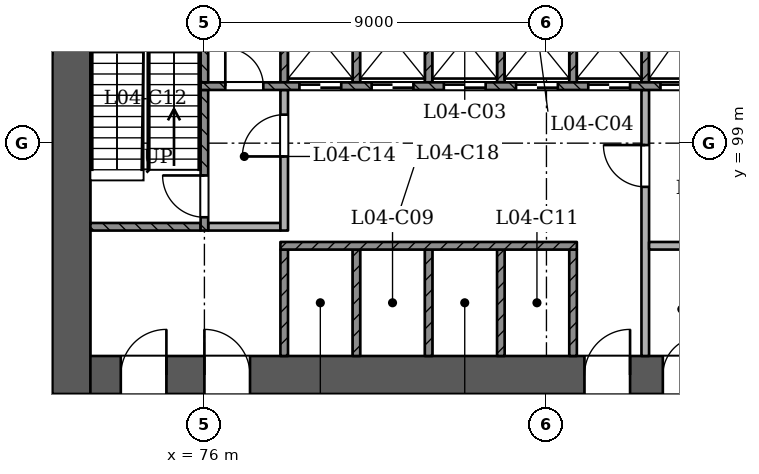
"""IFC4 building model, lengths in metres.
Left out: names, types, materials, properties, quantities, classifications, styles, units other than length and angle.
Written with IfcOpenShell. Run it as: python <this file> out.ifc"""

import sys

from ifc_helpers import new_model, si_unit, direction, frame, frame_2d, origin, place, context, subcontext, project, spatial, rectangle, extrude, element, fill, save


model = new_model("IFC4")
c1 = context("Model", 3, precision=1e-05, world=origin(), true_north=direction((0.0, 1.0)))
c2 = subcontext(c1, "Body", "Model", "MODEL_VIEW")
j1 = project(units=[si_unit("LENGTHUNIT", "METRE"), si_unit("PLANEANGLEUNIT", "RADIAN")], contexts=[c1])
p1 = place(None, origin())
s1 = spatial("IfcSite", under=j1, at=p1, CompositionType="ELEMENT")
p2 = place(p1, origin())
s2 = spatial("IfcBuilding", under=s1, at=p2, CompositionType="ELEMENT")
p3 = place(p2, frame((0.0, 0.0, 22.5)))
s3 = spatial("IfcBuildingStorey", under=s2, at=p3, CompositionType="ELEMENT", Elevation=22.5)
p4 = place(p3, frame((72.5, 92.9, 0.0), z_axis=(0.0, 0.0, 1.0), x_axis=(1.0, 0.0, 0.0)))
e1 = element("IfcWall", 1, at=p4, inside=s3, PredefinedType="SHEAR", context=c2, shape_type="SweptSolid", body=[
    extrude(rectangle(XDim=25.5, YDim=1.0, at=frame_2d((12.75, 0.0))), origin(), (0.0, 0.0, 1.0), 4.5),
])
p5 = place(p4, frame((1.3, 0.0, 0.0)))
e2 = element("IfcOpeningElement", 2, at=p5, cuts=e1, PredefinedType="OPENING", context=c2, shape_type="SweptSolid", body=[
    extrude(rectangle(XDim=1.2, YDim=2.1, at=frame_2d((0.6, 1.05))), frame((0.0, 0.51, 0.0), z_axis=(0.0, -1.0, 0.0), x_axis=(1.0, 0.0, 0.0)), (0.0, 0.0, 1.0), 1.021),
])
p6 = place(p4, frame((3.5, 0.0, 0.0)))
e3 = element("IfcOpeningElement", 3, at=p6, cuts=e1, PredefinedType="OPENING", context=c2, shape_type="SweptSolid", body=[
    extrude(rectangle(XDim=1.2, YDim=2.1, at=frame_2d((0.6, 1.05))), frame((0.0, 0.51, 0.0), z_axis=(0.0, -1.0, 0.0), x_axis=(1.0, 0.0, 0.0)), (0.0, 0.0, 1.0), 1.021),
])
p7 = place(p4, frame((13.5, 0.0, 0.0)))
e4 = element("IfcOpeningElement", 4, at=p7, cuts=e1, PredefinedType="OPENING", context=c2, shape_type="SweptSolid", body=[
    extrude(rectangle(XDim=1.2, YDim=2.1, at=frame_2d((0.6, 1.05))), frame((0.0, 0.51, 0.0), z_axis=(0.0, -1.0, 0.0), x_axis=(1.0, 0.0, 0.0)), (0.0, 0.0, 1.0), 1.021),
])
p8 = place(p4, frame((15.562, 0.0, 0.0)))
e5 = element("IfcOpeningElement", 5, at=p8, cuts=e1, PredefinedType="OPENING", context=c2, shape_type="SweptSolid", body=[
    extrude(rectangle(XDim=1.0, YDim=2.1, at=frame_2d((0.5, 1.05))), frame((0.0, 0.51, 0.0), z_axis=(0.0, -1.0, 0.0), x_axis=(1.0, 0.0, 0.0)), (0.0, 0.0, 1.0), 1.021),
])
p9 = place(p4, frame((17.8, 0.0, 0.0)))
e6 = element("IfcOpeningElement", 6, at=p9, cuts=e1, PredefinedType="OPENING", context=c2, shape_type="SweptSolid", body=[
    extrude(rectangle(XDim=1.0, YDim=2.1, at=frame_2d((0.5, 1.05))), frame((0.0, 0.51, 0.0), z_axis=(0.0, -1.0, 0.0), x_axis=(1.0, 0.0, 0.0)), (0.0, 0.0, 1.0), 1.021),
])
p10 = place(p4, frame((20.35, 0.0, 0.0)))
e7 = element("IfcOpeningElement", 7, at=p10, cuts=e1, PredefinedType="OPENING", context=c2, shape_type="SweptSolid", body=[
    extrude(rectangle(XDim=1.0, YDim=2.1, at=frame_2d((0.5, 1.05))), frame((0.0, 0.51, 0.0), z_axis=(0.0, -1.0, 0.0), x_axis=(1.0, 0.0, 0.0)), (0.0, 0.0, 1.0), 1.021),
])
p11 = place(p4, frame((22.837, 0.0, 0.0)))
e8 = element("IfcOpeningElement", 8, at=p11, cuts=e1, PredefinedType="OPENING", context=c2, shape_type="SweptSolid", body=[
    extrude(rectangle(XDim=1.0, YDim=2.1, at=frame_2d((0.5, 1.05))), frame((0.0, 0.51, 0.0), z_axis=(0.0, -1.0, 0.0), x_axis=(1.0, 0.0, 0.0)), (0.0, 0.0, 1.0), 1.021),
])
p12 = place(p3, frame((72.5, 103.9, 0.0), z_axis=(0.0, 0.0, 1.0), x_axis=(0.0, -1.0, 0.0)))
e9 = element("IfcWall", 9, at=p12, inside=s3, PredefinedType="SHEAR", context=c2, shape_type="SweptSolid", body=[
    extrude(rectangle(XDim=11.5, YDim=1.0, at=frame_2d((5.75, 0.0))), origin(), (0.0, 0.0, 1.0), 4.5),
])
p13 = place(p3, frame((61.093, 96.062, 0.0), z_axis=(0.0, 0.0, 1.0), x_axis=(0.5000018851, -0.866024315419, 0.0)))
e10 = element("IfcWall", 10, at=p13, inside=s3, PredefinedType="PARTITIONING", context=c2, shape_type="SweptSolid", body=[
    extrude(rectangle(XDim=45.0, YDim=0.15, at=frame_2d((22.5, 0.0))), origin(), (0.0, 0.0, 1.0), 3.6),
])
p14 = place(p13, frame((6.15, 0.0, 0.0)))
e11 = element("IfcOpeningElement", 11, at=p14, cuts=e10, PredefinedType="OPENING", context=c2, shape_type="SweptSolid", body=[
    extrude(rectangle(XDim=1.2, YDim=2.1, at=frame_2d((0.6, 1.05))), frame((0.0, 0.085, 0.0), z_axis=(0.0, -1.0, 0.0), x_axis=(1.0, 0.0, 0.0)), (0.0, 0.0, 1.0), 0.171),
])
p15 = place(p13, frame((16.3, 0.0, 0.0)))
e12 = element("IfcOpeningElement", 12, at=p15, cuts=e10, PredefinedType="OPENING", context=c2, shape_type="SweptSolid", body=[
    extrude(rectangle(XDim=1.2, YDim=2.1, at=frame_2d((0.6, 1.05))), frame((0.0, 0.085, 0.0), z_axis=(0.0, -1.0, 0.0), x_axis=(1.0, 0.0, 0.0)), (0.0, 0.0, 1.0), 0.171),
])
p16 = place(p13, frame((24.25, 0.0, 0.0)))
e13 = element("IfcOpeningElement", 13, at=p16, cuts=e10, PredefinedType="OPENING", context=c2, shape_type="SweptSolid", body=[
    extrude(rectangle(XDim=1.0, YDim=2.1, at=frame_2d((0.5, 1.05))), frame((0.0, 0.085, 0.0), z_axis=(0.0, -1.0, 0.0), x_axis=(1.0, 0.0, 0.0)), (0.0, 0.0, 1.0), 0.171),
])
p17 = place(p13, frame((27.721, 0.0, 0.0)))
e14 = element("IfcOpeningElement", 14, at=p17, cuts=e10, PredefinedType="OPENING", context=c2, shape_type="SweptSolid", body=[
    extrude(rectangle(XDim=0.9, YDim=2.1, at=frame_2d((0.45, 1.05))), frame((0.0, 0.085, 0.0), z_axis=(0.0, -1.0, 0.0), x_axis=(1.0, 0.0, 0.0)), (0.0, 0.0, 1.0), 0.171),
])
p18 = place(p13, frame((29.971, 0.0, 0.0)))
e15 = element("IfcOpeningElement", 15, at=p18, cuts=e10, PredefinedType="OPENING", context=c2, shape_type="SweptSolid", body=[
    extrude(rectangle(XDim=0.9, YDim=2.1, at=frame_2d((0.45, 1.05))), frame((0.0, 0.085, 0.0), z_axis=(0.0, -1.0, 0.0), x_axis=(1.0, 0.0, 0.0)), (0.0, 0.0, 1.0), 0.171),
])
p19 = place(p13, frame((37.65, 0.0, 0.0)))
e16 = element("IfcOpeningElement", 16, at=p19, cuts=e10, PredefinedType="OPENING", context=c2, shape_type="SweptSolid", body=[
    extrude(rectangle(XDim=1.2, YDim=2.1, at=frame_2d((0.6, 1.05))), frame((0.0, 0.085, 0.0), z_axis=(0.0, -1.0, 0.0), x_axis=(1.0, 0.0, 0.0)), (0.0, 0.0, 1.0), 0.171),
])
p20 = place(p3, frame((86.407, 57.091, 0.0), z_axis=(0.0, 0.0, 1.0), x_axis=(0.49999953585, 0.866025671762, 0.0)))
e17 = element("IfcWall", 17, at=p20, inside=s3, PredefinedType="PARTITIONING", context=c2, shape_type="SweptSolid", body=[
    extrude(rectangle(XDim=45.0, YDim=0.15, at=frame_2d((22.5, 0.0))), origin(), (0.0, 0.0, 1.0), 3.6),
])
p21 = place(p20, frame((6.15, 0.0, 0.0)))
e18 = element("IfcOpeningElement", 18, at=p21, cuts=e17, PredefinedType="OPENING", context=c2, shape_type="SweptSolid", body=[
    extrude(rectangle(XDim=1.2, YDim=2.1, at=frame_2d((0.6, 1.05))), frame((0.0, 0.085, 0.0), z_axis=(0.0, -1.0, 0.0), x_axis=(1.0, 0.0, 0.0)), (0.0, 0.0, 1.0), 0.171),
])
p22 = place(p20, frame((16.3, 0.0, 0.0)))
e19 = element("IfcOpeningElement", 19, at=p22, cuts=e17, PredefinedType="OPENING", context=c2, shape_type="SweptSolid", body=[
    extrude(rectangle(XDim=1.2, YDim=2.1, at=frame_2d((0.6, 1.05))), frame((0.0, 0.085, 0.0), z_axis=(0.0, -1.0, 0.0), x_axis=(1.0, 0.0, 0.0)), (0.0, 0.0, 1.0), 0.171),
])
p23 = place(p20, frame((24.25, 0.0, 0.0)))
e20 = element("IfcOpeningElement", 20, at=p23, cuts=e17, PredefinedType="OPENING", context=c2, shape_type="SweptSolid", body=[
    extrude(rectangle(XDim=1.0, YDim=2.1, at=frame_2d((0.5, 1.05))), frame((0.0, 0.085, 0.0), z_axis=(0.0, -1.0, 0.0), x_axis=(1.0, 0.0, 0.0)), (0.0, 0.0, 1.0), 0.171),
])
p24 = place(p20, frame((30.9, 0.0, 0.0)))
e21 = element("IfcOpeningElement", 21, at=p24, cuts=e17, PredefinedType="OPENING", context=c2, shape_type="SweptSolid", body=[
    extrude(rectangle(XDim=1.2, YDim=2.1, at=frame_2d((0.6, 1.05))), frame((0.0, 0.085, 0.0), z_axis=(0.0, -1.0, 0.0), x_axis=(1.0, 0.0, 0.0)), (0.0, 0.0, 1.0), 0.171),
])
p25 = place(p20, frame((36.761, 0.0, 0.0)))
e22 = element("IfcOpeningElement", 22, at=p25, cuts=e17, PredefinedType="OPENING", context=c2, shape_type="SweptSolid", body=[
    extrude(rectangle(XDim=1.0, YDim=2.1, at=frame_2d((0.5, 1.05))), frame((0.0, 0.085, 0.0), z_axis=(0.0, -1.0, 0.0), x_axis=(1.0, 0.0, 0.0)), (0.0, 0.0, 1.0), 0.171),
])
p26 = place(p20, frame((39.011, 0.0, 0.0)))
e23 = element("IfcOpeningElement", 23, at=p26, cuts=e17, PredefinedType="OPENING", context=c2, shape_type="SweptSolid", body=[
    extrude(rectangle(XDim=1.0, YDim=2.1, at=frame_2d((0.5, 1.05))), frame((0.0, 0.085, 0.0), z_axis=(0.0, -1.0, 0.0), x_axis=(1.0, 0.0, 0.0)), (0.0, 0.0, 1.0), 0.171),
])
p27 = place(p20, frame((42.25, 0.0, 0.0)))
e24 = element("IfcOpeningElement", 24, at=p27, cuts=e17, PredefinedType="OPENING", context=c2, shape_type="SweptSolid", body=[
    extrude(rectangle(XDim=1.0, YDim=2.1, at=frame_2d((0.5, 1.05))), frame((0.0, 0.085, 0.0), z_axis=(0.0, -1.0, 0.0), x_axis=(1.0, 0.0, 0.0)), (0.0, 0.0, 1.0), 0.171),
])
p28 = place(p3, frame((72.0, 101.401, 0.0), z_axis=(0.0, 0.0, 1.0), x_axis=(-0.999999909973, -0.000424328109, 0.0)))
e25 = element("IfcWall", 25, at=p28, inside=s3, PredefinedType="PARTITIONING", context=c2, shape_type="SweptSolid", body=[
    extrude(rectangle(XDim=1.726, YDim=0.15, at=frame_2d((0.863, 0.0))), origin(), (0.0, 0.0, 1.0), 4.0),
])
for number, where, z_axis, x_axis in (
    (26, (78.1, 93.4, 0.0), (0.0, 0.0, 1.0), (0.0, 1.0, 0.0)),
    (27, (80.0, 93.4, 0.0), (0.0, 0.0, 1.0), (0.0, 1.0, 0.0)),
    (28, (81.9, 93.4, 0.0), (0.0, 0.0, 1.0), (0.0, 1.0, 0.0)),
    (29, (83.8, 93.4, 0.0), (0.0, 0.0, 1.0), (0.0, 1.0, 0.0)),
    (30, (85.7, 93.4, 0.0), (0.0, 0.0, 1.0), (0.0, 1.0, 0.0)),
):
    element("IfcWall", number, at=place(p3, frame(where, z_axis=z_axis, x_axis=x_axis)), inside=s3, PredefinedType="SOLIDWALL", context=c2, shape_type="SweptSolid", body=[
        extrude(rectangle(XDim=2.8, YDim=0.2, at=frame_2d((1.4, 0.0))), origin(), (0.0, 0.0, 1.0), 4.0),
    ])
p29 = place(p3, frame((87.6, 93.4, 0.0), z_axis=(0.0, 0.0, 1.0), x_axis=(0.0, 1.0, 0.0)))
e31 = element("IfcWall", 31, at=p29, inside=s3, PredefinedType="PARTITIONING", context=c2, shape_type="SweptSolid", body=[
    extrude(rectangle(XDim=7.0, YDim=0.2, at=frame_2d((3.5, 0.0))), origin(), (0.0, 0.0, 1.0), 4.0),
])
p30 = place(p29, frame((4.45, 0.0, 0.0)))
e32 = element("IfcOpeningElement", 32, at=p30, cuts=e31, PredefinedType="OPENING", context=c2, shape_type="SweptSolid", body=[
    extrude(rectangle(XDim=1.1, YDim=2.1, at=frame_2d((0.55, 1.05))), frame((0.0, 0.11, 0.0), z_axis=(0.0, -1.0, 0.0), x_axis=(1.0, 0.0, 0.0)), (0.0, 0.0, 1.0), 0.221),
])
p31 = place(p3, frame((78.0, 96.3, 0.0), z_axis=(0.0, 0.0, 1.0), x_axis=(1.0, 0.0, 0.0)))
e33 = element("IfcWall", 33, at=p31, inside=s3, PredefinedType="SOLIDWALL", context=c2, shape_type="SweptSolid", body=[
    extrude(rectangle(XDim=7.8, YDim=0.2, at=frame_2d((3.9, 0.0))), origin(), (0.0, 0.0, 1.0), 4.0),
])
p32 = place(p3, frame((87.7, 96.3, 0.0), z_axis=(0.0, 0.0, 1.0), x_axis=(1.0, 0.0, 0.0)))
e34 = element("IfcWall", 34, at=p32, inside=s3, PredefinedType="PARTITIONING", context=c2, shape_type="SweptSolid", body=[
    extrude(rectangle(XDim=3.6, YDim=0.2, at=frame_2d((1.8, 0.0))), origin(), (0.0, 0.0, 1.0), 4.0),
])
p33 = place(p3, frame((73.0, 96.8, 0.0), z_axis=(0.0, 0.0, 1.0), x_axis=(1.0, 0.0, 0.0)))
e35 = element("IfcWall", 35, at=p33, inside=s3, PredefinedType="SOLIDWALL", context=c2, shape_type="SweptSolid", body=[
    extrude(rectangle(XDim=2.9, YDim=0.2, at=frame_2d((1.45, 0.0))), origin(), (0.0, 0.0, 1.0), 4.0),
])
p34 = place(p3, frame((76.0, 96.7, 0.0), z_axis=(0.0, 0.0, 1.0), x_axis=(0.0, 1.0, 0.0)))
e36 = element("IfcWall", 36, at=p34, inside=s3, PredefinedType="SOLIDWALL", context=c2, shape_type="SweptSolid", body=[
    extrude(rectangle(XDim=3.7, YDim=0.2, at=frame_2d((1.85, 0.0))), origin(), (0.0, 0.0, 1.0), 4.0),
])
p35 = place(p34, frame((0.35, 0.0, 0.0)))
e37 = element("IfcOpeningElement", 37, at=p35, cuts=e36, PredefinedType="OPENING", context=c2, shape_type="SweptSolid", body=[
    extrude(rectangle(XDim=1.1, YDim=2.1, at=frame_2d((0.55, 1.05))), frame((0.0, 0.11, 0.0), z_axis=(0.0, -1.0, 0.0), x_axis=(1.0, 0.0, 0.0)), (0.0, 0.0, 1.0), 0.221),
])
p36 = place(p3, frame((76.1, 96.8, 0.0), z_axis=(0.0, 0.0, 1.0), x_axis=(1.0, 0.0, 0.0)))
e38 = element("IfcWall", 38, at=p36, inside=s3, PredefinedType="PARTITIONING", context=c2, shape_type="SweptSolid", body=[
    extrude(rectangle(XDim=1.9, YDim=0.2, at=frame_2d((0.95, 0.0))), origin(), (0.0, 0.0, 1.0), 4.0),
])
p37 = place(p3, frame((78.1, 96.7, 0.0), z_axis=(0.0, 0.0, 1.0), x_axis=(0.0, 1.0, 0.0)))
e39 = element("IfcWall", 39, at=p37, inside=s3, PredefinedType="PARTITIONING", context=c2, shape_type="SweptSolid", body=[
    extrude(rectangle(XDim=3.7, YDim=0.2, at=frame_2d((1.85, 0.0))), origin(), (0.0, 0.0, 1.0), 4.0),
])
p38 = place(p37, frame((1.95, 0.0, 0.0)))
e40 = element("IfcOpeningElement", 40, at=p38, cuts=e39, PredefinedType="OPENING", context=c2, shape_type="SweptSolid", body=[
    extrude(rectangle(XDim=1.1, YDim=2.1, at=frame_2d((0.55, 1.05))), frame((0.0, 0.11, 0.0), z_axis=(0.0, -1.0, 0.0), x_axis=(1.0, 0.0, 0.0)), (0.0, 0.0, 1.0), 0.221),
])
p39 = place(p3, frame((75.9, 100.5, 0.0), z_axis=(0.0, 0.0, 1.0), x_axis=(1.0, 0.0, 0.0)))
e41 = element("IfcWall", 41, at=p39, inside=s3, PredefinedType="SOLIDWALL", context=c2, shape_type="SweptSolid", body=[
    extrude(rectangle(XDim=18.2, YDim=0.2, at=frame_2d((9.1, 0.0))), origin(), (0.0, 0.0, 1.0), 4.0),
])
p40 = place(p39, frame((2.6, 0.0, 0.0)))
e42 = element("IfcOpeningElement", 42, at=p40, cuts=e41, PredefinedType="OPENING", context=c2, shape_type="SweptSolid", body=[
    extrude(rectangle(XDim=1.1, YDim=2.1, at=frame_2d((0.55, 1.05))), frame((0.0, 0.11, 0.0), z_axis=(0.0, -1.0, 0.0), x_axis=(1.0, 0.0, 0.0)), (0.0, 0.0, 1.0), 0.221),
])
p41 = place(p39, frame((4.5, 0.0, 0.0)))
e43 = element("IfcOpeningElement", 43, at=p41, cuts=e41, PredefinedType="OPENING", context=c2, shape_type="SweptSolid", body=[
    extrude(rectangle(XDim=1.1, YDim=2.1, at=frame_2d((0.55, 1.05))), frame((0.0, 0.11, 0.0), z_axis=(0.0, -1.0, 0.0), x_axis=(1.0, 0.0, 0.0)), (0.0, 0.0, 1.0), 0.221),
])
p42 = place(p39, frame((6.4, 0.0, 0.0)))
e44 = element("IfcOpeningElement", 44, at=p42, cuts=e41, PredefinedType="OPENING", context=c2, shape_type="SweptSolid", body=[
    extrude(rectangle(XDim=1.1, YDim=2.1, at=frame_2d((0.55, 1.05))), frame((0.0, 0.11, 0.0), z_axis=(0.0, -1.0, 0.0), x_axis=(1.0, 0.0, 0.0)), (0.0, 0.0, 1.0), 0.221),
])
p43 = place(p39, frame((8.3, 0.0, 0.0)))
e45 = element("IfcOpeningElement", 45, at=p43, cuts=e41, PredefinedType="OPENING", context=c2, shape_type="SweptSolid", body=[
    extrude(rectangle(XDim=1.1, YDim=2.1, at=frame_2d((0.55, 1.05))), frame((0.0, 0.11, 0.0), z_axis=(0.0, -1.0, 0.0), x_axis=(1.0, 0.0, 0.0)), (0.0, 0.0, 1.0), 0.221),
])
p44 = place(p39, frame((10.2, 0.0, 0.0)))
e46 = element("IfcOpeningElement", 46, at=p44, cuts=e41, PredefinedType="OPENING", context=c2, shape_type="SweptSolid", body=[
    extrude(rectangle(XDim=1.1, YDim=2.1, at=frame_2d((0.55, 1.05))), frame((0.0, 0.11, 0.0), z_axis=(0.0, -1.0, 0.0), x_axis=(1.0, 0.0, 0.0)), (0.0, 0.0, 1.0), 0.221),
])
p45 = place(p39, frame((12.1, 0.0, 0.0)))
e47 = element("IfcOpeningElement", 47, at=p45, cuts=e41, PredefinedType="OPENING", context=c2, shape_type="SweptSolid", body=[
    extrude(rectangle(XDim=1.1, YDim=2.1, at=frame_2d((0.55, 1.05))), frame((0.0, 0.11, 0.0), z_axis=(0.0, -1.0, 0.0), x_axis=(1.0, 0.0, 0.0)), (0.0, 0.0, 1.0), 0.221),
])
p46 = place(p39, frame((14.0, 0.0, 0.0)))
e48 = element("IfcOpeningElement", 48, at=p46, cuts=e41, PredefinedType="OPENING", context=c2, shape_type="SweptSolid", body=[
    extrude(rectangle(XDim=1.1, YDim=2.1, at=frame_2d((0.55, 1.05))), frame((0.0, 0.11, 0.0), z_axis=(0.0, -1.0, 0.0), x_axis=(1.0, 0.0, 0.0)), (0.0, 0.0, 1.0), 0.221),
])
p47 = place(p39, frame((0.65, 0.0, 0.0)))
e49 = element("IfcOpeningElement", 49, at=p47, cuts=e41, PredefinedType="OPENING", context=c2, shape_type="SweptSolid", body=[
    extrude(rectangle(XDim=1.0, YDim=2.1, at=frame_2d((0.5, 1.05))), frame((0.0, 0.11, 0.0), z_axis=(0.0, -1.0, 0.0), x_axis=(1.0, 0.0, 0.0)), (0.0, 0.0, 1.0), 0.221),
])
p48 = place(p39, frame((16.3, 0.0, 0.0)))
e50 = element("IfcOpeningElement", 50, at=p48, cuts=e41, PredefinedType="OPENING", context=c2, shape_type="SweptSolid", body=[
    extrude(rectangle(XDim=1.0, YDim=2.1, at=frame_2d((0.5, 1.05))), frame((0.0, 0.11, 0.0), z_axis=(0.0, -1.0, 0.0), x_axis=(1.0, 0.0, 0.0)), (0.0, 0.0, 1.0), 0.221),
])
for number, where, z_axis, x_axis in (
    (51, (76.0, 100.6, 0.0), (0.0, 0.0, 1.0), (0.0, 1.0, 0.0)),
    (52, (78.1, 100.6, 0.0), (0.0, 0.0, 1.0), (0.0, 1.0, 0.0)),
    (53, (80.0, 100.6, 0.0), (0.0, 0.0, 1.0), (0.0, 1.0, 0.0)),
    (54, (81.9, 100.6, 0.0), (0.0, 0.0, 1.0), (0.0, 1.0, 0.0)),
    (55, (83.8, 100.6, 0.0), (0.0, 0.0, 1.0), (0.0, 1.0, 0.0)),
    (56, (85.7, 100.6, 0.0), (0.0, 0.0, 1.0), (0.0, 1.0, 0.0)),
    (57, (87.6, 100.6, 0.0), (0.0, 0.0, 1.0), (0.0, 1.0, 0.0)),
):
    element("IfcWall", number, at=place(p3, frame(where, z_axis=z_axis, x_axis=x_axis)), inside=s3, PredefinedType="SOLIDWALL", context=c2, shape_type="SweptSolid", body=[
        extrude(rectangle(XDim=2.8, YDim=0.2, at=frame_2d((1.4, 0.0))), origin(), (0.0, 0.0, 1.0), 4.0),
    ])
p49 = place(p40, origin())
e58 = element("IfcDoor", 58, at=p49, inside=s3, OperationType="SLIDING_TO_RIGHT", PredefinedType="NOTDEFINED", context=c2, shape_type="SweptSolid", body=[
    extrude(rectangle(XDim=1.1, YDim=2.1, at=frame_2d((0.55, 1.05))), frame((0.0, 0.025, 0.0), z_axis=(0.0, -1.0, 0.0), x_axis=(1.0, 0.0, 0.0)), (0.0, 0.0, 1.0), 0.05),
])
fill(e42, e58)
p50 = place(p41, origin())
e59 = element("IfcDoor", 59, at=p50, inside=s3, OperationType="SLIDING_TO_LEFT", PredefinedType="NOTDEFINED", context=c2, shape_type="SweptSolid", body=[
    extrude(rectangle(XDim=1.1, YDim=2.1, at=frame_2d((0.55, 1.05))), frame((0.0, 0.025, 0.0), z_axis=(0.0, -1.0, 0.0), x_axis=(1.0, 0.0, 0.0)), (0.0, 0.0, 1.0), 0.05),
])
fill(e43, e59)
p51 = place(p42, origin())
e60 = element("IfcDoor", 60, at=p51, inside=s3, OperationType="SLIDING_TO_RIGHT", PredefinedType="NOTDEFINED", context=c2, shape_type="SweptSolid", body=[
    extrude(rectangle(XDim=1.1, YDim=2.1, at=frame_2d((0.55, 1.05))), frame((0.0, 0.025, 0.0), z_axis=(0.0, -1.0, 0.0), x_axis=(1.0, 0.0, 0.0)), (0.0, 0.0, 1.0), 0.05),
])
fill(e44, e60)
p52 = place(p43, origin())
e61 = element("IfcDoor", 61, at=p52, inside=s3, OperationType="SLIDING_TO_LEFT", PredefinedType="NOTDEFINED", context=c2, shape_type="SweptSolid", body=[
    extrude(rectangle(XDim=1.1, YDim=2.1, at=frame_2d((0.55, 1.05))), frame((0.0, 0.025, 0.0), z_axis=(0.0, -1.0, 0.0), x_axis=(1.0, 0.0, 0.0)), (0.0, 0.0, 1.0), 0.05),
])
fill(e45, e61)
p53 = place(p44, origin())
e62 = element("IfcDoor", 62, at=p53, inside=s3, OperationType="SLIDING_TO_RIGHT", PredefinedType="NOTDEFINED", context=c2, shape_type="SweptSolid", body=[
    extrude(rectangle(XDim=1.1, YDim=2.1, at=frame_2d((0.55, 1.05))), frame((0.0, 0.025, 0.0), z_axis=(0.0, -1.0, 0.0), x_axis=(1.0, 0.0, 0.0)), (0.0, 0.0, 1.0), 0.05),
])
fill(e46, e62)
p54 = place(p45, origin())
e63 = element("IfcDoor", 63, at=p54, inside=s3, OperationType="SLIDING_TO_RIGHT", PredefinedType="NOTDEFINED", context=c2, shape_type="SweptSolid", body=[
    extrude(rectangle(XDim=1.1, YDim=2.1, at=frame_2d((0.55, 1.05))), frame((0.0, 0.025, 0.0), z_axis=(0.0, -1.0, 0.0), x_axis=(1.0, 0.0, 0.0)), (0.0, 0.0, 1.0), 0.05),
])
fill(e47, e63)
p55 = place(p35, origin())
e64 = element("IfcDoor", 64, at=p55, inside=s3, OperationType="SINGLE_SWING_RIGHT", PredefinedType="NOTDEFINED", context=c2, shape_type="SweptSolid", body=[
    extrude(rectangle(XDim=1.1, YDim=2.1, at=frame_2d((0.55, 1.05))), frame((0.0, 0.025, 0.0), z_axis=(0.0, -1.0, 0.0), x_axis=(1.0, 0.0, 0.0)), (0.0, 0.0, 1.0), 0.05),
])
fill(e37, e64)
p56 = place(p38, origin())
e65 = element("IfcDoor", 65, at=p56, inside=s3, OperationType="SINGLE_SWING_LEFT", PredefinedType="NOTDEFINED", context=c2, shape_type="SweptSolid", body=[
    extrude(rectangle(XDim=1.1, YDim=2.1, at=frame_2d((0.55, 1.05))), frame((0.0, 0.025, 0.0), z_axis=(0.0, -1.0, 0.0), x_axis=(1.0, 0.0, 0.0)), (0.0, 0.0, 1.0), 0.05),
])
fill(e40, e65)
p57 = place(p30, origin())
e66 = element("IfcDoor", 66, at=p57, inside=s3, OperationType="SINGLE_SWING_RIGHT", PredefinedType="NOTDEFINED", context=c2, shape_type="SweptSolid", body=[
    extrude(rectangle(XDim=1.1, YDim=2.1, at=frame_2d((0.55, 1.05))), frame((0.0, 0.025, 0.0), z_axis=(0.0, -1.0, 0.0), x_axis=(1.0, 0.0, 0.0)), (0.0, 0.0, 1.0), 0.05),
])
fill(e32, e66)
p58 = place(p5, origin())
e67 = element("IfcDoor", 67, at=p58, inside=s3, OperationType="SINGLE_SWING_RIGHT", PredefinedType="NOTDEFINED", context=c2, shape_type="SweptSolid", body=[
    extrude(rectangle(XDim=1.2, YDim=2.1, at=frame_2d((0.6, 1.05))), frame((0.0, 0.025, 0.0), z_axis=(0.0, -1.0, 0.0), x_axis=(1.0, 0.0, 0.0)), (0.0, 0.0, 1.0), 0.05),
])
fill(e2, e67)
p59 = place(p6, origin())
e68 = element("IfcDoor", 68, at=p59, inside=s3, OperationType="SINGLE_SWING_LEFT", PredefinedType="NOTDEFINED", context=c2, shape_type="SweptSolid", body=[
    extrude(rectangle(XDim=1.2, YDim=2.1, at=frame_2d((0.6, 1.05))), frame((0.0, 0.025, 0.0), z_axis=(0.0, -1.0, 0.0), x_axis=(1.0, 0.0, 0.0)), (0.0, 0.0, 1.0), 0.05),
])
fill(e3, e68)
p60 = place(p7, origin())
e69 = element("IfcDoor", 69, at=p60, inside=s3, OperationType="SINGLE_SWING_RIGHT", PredefinedType="NOTDEFINED", context=c2, shape_type="SweptSolid", body=[
    extrude(rectangle(XDim=1.2, YDim=2.1, at=frame_2d((0.6, 1.05))), frame((0.0, 0.025, 0.0), z_axis=(0.0, -1.0, 0.0), x_axis=(1.0, 0.0, 0.0)), (0.0, 0.0, 1.0), 0.05),
])
fill(e4, e69)
p61 = place(p47, origin())
e70 = element("IfcDoor", 70, at=p61, inside=s3, OperationType="SINGLE_SWING_LEFT", PredefinedType="NOTDEFINED", context=c2, shape_type="SweptSolid", body=[
    extrude(rectangle(XDim=1.0, YDim=2.1, at=frame_2d((0.5, 1.05))), frame((0.0, 0.025, 0.0), z_axis=(0.0, -1.0, 0.0), x_axis=(1.0, 0.0, 0.0)), (0.0, 0.0, 1.0), 0.05),
])
fill(e49, e70)
p62 = place(p8, origin())
e71 = element("IfcDoor", 71, at=p62, inside=s3, OperationType="SINGLE_SWING_RIGHT", PredefinedType="NOTDEFINED", context=c2, shape_type="SweptSolid", body=[
    extrude(rectangle(XDim=1.0, YDim=2.1, at=frame_2d((0.5, 1.05))), frame((0.0, 0.025, 0.0), z_axis=(0.0, -1.0, 0.0), x_axis=(1.0, 0.0, 0.0)), (0.0, 0.0, 1.0), 0.05),
])
fill(e5, e71)
save(model, sys.argv[1])
